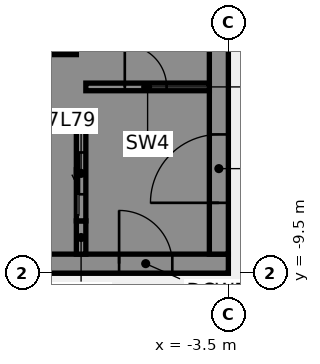
"""IFC4 building model, lengths in metres.
Left out: names, types, materials, properties, quantities, classifications, styles, units other than length and angle.
Written with IfcOpenShell. Run it as: python <this file> out.ifc"""

import sys

from ifc_helpers import new_model, si_unit, direction, frame, frame_2d, origin, place, context, subcontext, project, spatial, polyline, rectangle, outline, extrude, element, fill, save


model = new_model("IFC4")
c1 = context("Model", 3, precision=1e-05, world=origin(), true_north=direction((0.0, 1.0)))
c2 = subcontext(c1, "Body", "Model", "MODEL_VIEW")
j1 = project(units=[si_unit("LENGTHUNIT", "METRE"), si_unit("PLANEANGLEUNIT", "RADIAN")], contexts=[c1])
p1 = place(None, origin())
s1 = spatial("IfcSite", under=j1, at=p1, CompositionType="ELEMENT")
p2 = place(p1, origin())
s2 = spatial("IfcBuilding", under=s1, at=p2, CompositionType="ELEMENT")
p3 = place(p2, frame((0.0, 0.0, 321.4)))
s3 = spatial("IfcBuildingStorey", under=s2, at=p3, CompositionType="ELEMENT", Elevation=321.4)
p4 = place(p3, frame((-16.5, -9.25, 0.0), z_axis=(0.0, 0.0, 1.0), x_axis=(1.0, 0.0, 0.0)))
e1 = element("IfcWall", 1, at=p4, inside=s3, PredefinedType="SHEAR", context=c2, shape_type="SweptSolid", body=[
    extrude(rectangle(XDim=13.0, YDim=0.5, at=frame_2d((6.5, 0.0))), origin(), (0.0, 0.0, 1.0), 3.82),
])
p5 = place(p4, frame((4.15, 0.0, 0.0)))
e2 = element("IfcOpeningElement", 2, at=p5, cuts=e1, PredefinedType="OPENING", context=c2, shape_type="SweptSolid", body=[
    extrude(rectangle(XDim=1.4, YDim=2.1, at=frame_2d((0.7, 1.05))), frame((0.0, 0.26, 0.0), z_axis=(0.0, -1.0, 0.0), x_axis=(1.0, 0.0, 0.0)), (0.0, 0.0, 1.0), 0.52),
])
p6 = place(p4, frame((10.125, 0.0, 0.0)))
e3 = element("IfcOpeningElement", 3, at=p6, cuts=e1, PredefinedType="OPENING", context=c2, shape_type="SweptSolid", body=[
    extrude(rectangle(XDim=1.4, YDim=2.1, at=frame_2d((0.7, 1.05))), frame((0.0, 0.26, 0.0), z_axis=(0.0, -1.0, 0.0), x_axis=(1.0, 0.0, 0.0)), (0.0, 0.0, 1.0), 0.52),
])
p7 = place(p3, origin())
e4 = element("IfcWall", 4, at=p7, inside=s3, PredefinedType="SHEAR", context=c2, shape_type="SweptSolid", body=[
    extrude(outline(polyline([(-9.8, -5.625), (-7.5, -5.625), (-7.25, -5.625), (-7.25, 9.0), (-7.5, 9.0), (-9.8, 9.0), (-9.8, 8.125), (-7.5, 8.125), (-7.5, -5.375), (-9.8, -5.375), (-9.8, -5.625)])), origin(), (0.0, 0.0, 1.0), 3.82),
])
p8 = place(p3, origin())
e5 = element("IfcWall", 5, at=p8, inside=s3, PredefinedType="SHEAR", context=c2, shape_type="SweptSolid", body=[
    extrude(outline(polyline([(-7.5, -8.125), (-9.55, -8.125), (-9.55, -5.625), (-9.8, -5.625), (-9.8, -8.125), (-9.8, -9.0), (-7.5, -9.0), (-7.5, -8.125)])), origin(), (0.0, 0.0, 1.0), 3.82),
])
p9 = place(p3, frame((-7.375, -9.0, 0.0), z_axis=(0.0, 0.0, 1.0), x_axis=(0.0, 1.0, 0.0)))
e6 = element("IfcWall", 6, at=p9, inside=s3, PredefinedType="SHEAR", context=c2, shape_type="SweptSolid", body=[
    extrude(rectangle(XDim=0.875, YDim=0.25, at=frame_2d((0.438, 0.0))), origin(), (0.0, 0.0, 1.0), 3.82),
])
p10 = place(p3, frame((-7.375, -8.125, 0.0), z_axis=(0.0, 0.0, 1.0), x_axis=(0.0, 1.0, 0.0)))
e7 = element("IfcWall", 7, at=p10, inside=s3, PredefinedType="SHEAR", context=c2, shape_type="SweptSolid", body=[
    extrude(rectangle(XDim=2.5, YDim=0.25, at=frame_2d((1.25, 0.0))), origin(), (0.0, 0.0, 1.0), 3.82),
])
p11 = place(p10, frame((0.7, 0.0, 0.0)))
e8 = element("IfcOpeningElement", 8, at=p11, cuts=e7, PredefinedType="OPENING", context=c2, shape_type="SweptSolid", body=[
    extrude(rectangle(XDim=1.1, YDim=2.1, at=frame_2d((0.55, 1.05))), frame((0.0, 0.135, 0.0), z_axis=(0.0, -1.0, 0.0), x_axis=(1.0, 0.0, 0.0)), (0.0, 0.0, 1.0), 0.27),
])
p12 = place(p3, frame((-3.75, -9.0, 0.0), z_axis=(0.0, 0.0, 1.0), x_axis=(0.0, 1.0, 0.0)))
e9 = element("IfcWall", 9, at=p12, inside=s3, PredefinedType="SHEAR", context=c2, shape_type="SweptSolid", body=[
    extrude(rectangle(XDim=18.0, YDim=0.5, at=frame_2d((9.0, 0.0))), origin(), (0.0, 0.0, 1.0), 3.82),
])
p13 = place(p12, frame((1.35, 0.0, 0.0)))
e10 = element("IfcOpeningElement", 10, at=p13, cuts=e9, PredefinedType="OPENING", context=c2, shape_type="SweptSolid", body=[
    extrude(rectangle(XDim=1.8, YDim=2.1, at=frame_2d((0.9, 1.05))), frame((0.0, 0.26, 0.0), z_axis=(0.0, -1.0, 0.0), x_axis=(1.0, 0.0, 0.0)), (0.0, 0.0, 1.0), 0.52),
])
p14 = place(p12, frame((13.9, 0.0, 0.0)))
e11 = element("IfcOpeningElement", 11, at=p14, cuts=e9, PredefinedType="OPENING", context=c2, shape_type="SweptSolid", body=[
    extrude(rectangle(XDim=1.0, YDim=2.1, at=frame_2d((0.5, 1.05))), frame((0.0, 0.26, 0.0), z_axis=(0.0, -1.0, 0.0), x_axis=(1.0, 0.0, 0.0)), (0.0, 0.0, 1.0), 0.52),
])
p15 = place(p3, frame((-7.25, -4.6, 0.0), z_axis=(0.0, 0.0, 1.0), x_axis=(1.0, 0.0, 0.0)))
e12 = element("IfcWall", 12, at=p15, inside=s3, PredefinedType="SHEAR", context=c2, shape_type="SweptSolid", body=[
    extrude(rectangle(XDim=3.25, YDim=0.2, at=frame_2d((1.625, 0.0))), origin(), (0.0, 0.0, 1.0), 3.82),
])
p16 = place(p15, frame((1.025, 0.0, 0.0)))
e13 = element("IfcOpeningElement", 13, at=p16, cuts=e12, PredefinedType="OPENING", context=c2, shape_type="SweptSolid", body=[
    extrude(rectangle(XDim=1.1, YDim=2.1, at=frame_2d((0.55, 1.05))), frame((0.0, 0.11, 0.0), z_axis=(0.0, -1.0, 0.0), x_axis=(1.0, 0.0, 0.0)), (0.0, 0.0, 1.0), 0.22),
])
p17 = place(p3, frame((-9.8, -3.625, 0.0), z_axis=(0.0, 0.0, 1.0), x_axis=(1.0, 0.0, 0.0)))
e14 = element("IfcWall", 14, at=p17, inside=s3, PredefinedType="PARTITIONING", context=c2, shape_type="SweptSolid", body=[
    extrude(rectangle(XDim=2.3, YDim=0.25, at=frame_2d((1.15, 0.0))), origin(), (0.0, 0.0, 1.0), 3.82),
])
p18 = place(p6, origin())
e15 = element("IfcDoor", 15, at=p18, inside=s3, OperationType="SINGLE_SWING_LEFT", PredefinedType="DOOR", context=c2, shape_type="SweptSolid", body=[
    extrude(rectangle(XDim=1.4, YDim=2.1, at=frame_2d((0.7, 1.05))), frame((0.0, 0.025, 0.0), z_axis=(0.0, -1.0, 0.0), x_axis=(1.0, 0.0, 0.0)), (0.0, 0.0, 1.0), 0.05),
])
fill(e3, e15)
p19 = place(p13, origin())
e16 = element("IfcDoor", 16, at=p19, inside=s3, OperationType="SINGLE_SWING_LEFT", PredefinedType="DOOR", context=c2, shape_type="SweptSolid", body=[
    extrude(rectangle(XDim=1.8, YDim=2.1, at=frame_2d((0.9, 1.05))), frame((0.0, 0.025, 0.0), z_axis=(0.0, -1.0, 0.0), x_axis=(1.0, 0.0, 0.0)), (0.0, 0.0, 1.0), 0.05),
])
fill(e10, e16)
p20 = place(p16, origin())
e17 = element("IfcDoor", 17, at=p20, inside=s3, OperationType="SINGLE_SWING_LEFT", PredefinedType="DOOR", context=c2, shape_type="SweptSolid", body=[
    extrude(rectangle(XDim=1.1, YDim=2.1, at=frame_2d((0.55, 1.05))), frame((0.0, 0.025, 0.0), z_axis=(0.0, -1.0, 0.0), x_axis=(1.0, 0.0, 0.0)), (0.0, 0.0, 1.0), 0.05),
])
fill(e13, e17)
p21 = place(p11, origin())
e18 = element("IfcDoor", 18, at=p21, inside=s3, OperationType="SLIDING_TO_LEFT", PredefinedType="DOOR", context=c2, shape_type="SweptSolid", body=[
    extrude(rectangle(XDim=1.1, YDim=2.1, at=frame_2d((0.55, 1.05))), frame((0.0, 0.025, 0.0), z_axis=(0.0, -1.0, 0.0), x_axis=(1.0, 0.0, 0.0)), (0.0, 0.0, 1.0), 0.05),
])
fill(e8, e18)
save(model, sys.argv[1])
